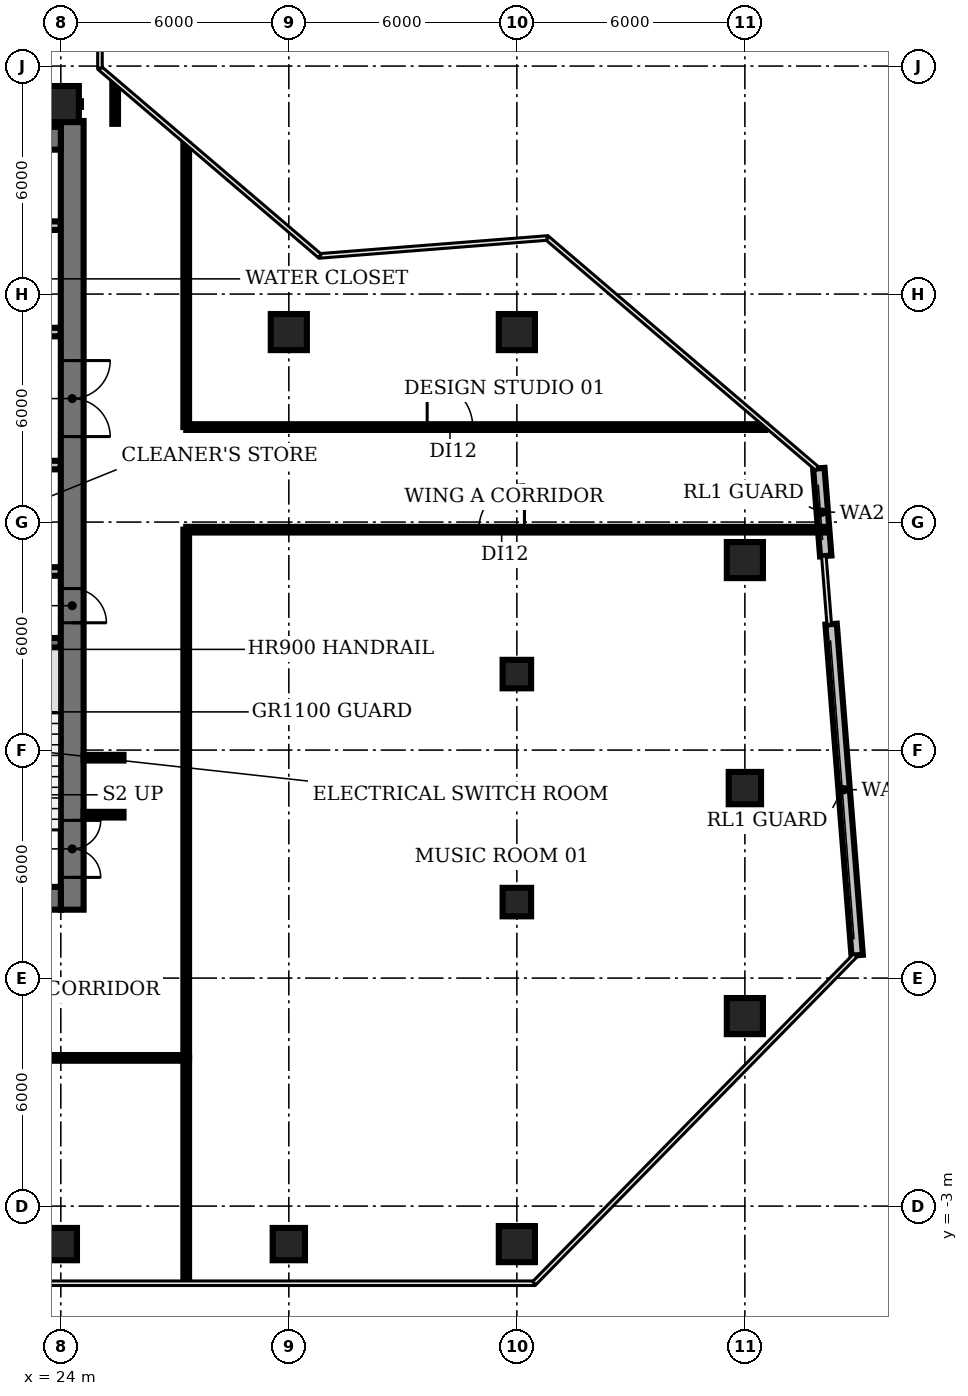
"""IFC4 building model, lengths in metres.
Left out: names, types, materials, properties, quantities, classifications, styles, units other than length and angle.
Written with IfcOpenShell. Run it as: python <this file> out.ifc"""

import sys

from ifc_helpers import new_model, si_unit, direction, frame, frame_2d, origin, origin_2d, place, context, subcontext, project, spatial, rectangle, circle, extrude, element, fill, save


model = new_model("IFC4")
c1 = context("Model", 3, precision=1e-05, world=origin(), true_north=direction((0.0, 1.0)))
c2 = subcontext(c1, "Body", "Model", "MODEL_VIEW")
j1 = project(units=[si_unit("LENGTHUNIT", "METRE"), si_unit("PLANEANGLEUNIT", "RADIAN")], contexts=[c1])
p1 = place(None, origin())
s1 = spatial("IfcSite", under=j1, at=p1, CompositionType="ELEMENT")
p2 = place(p1, origin())
s2 = spatial("IfcBuilding", under=s1, at=p2, CompositionType="ELEMENT")
p3 = place(p2, frame((0.0, 0.0, 188.6)))
s3 = spatial("IfcBuildingStorey", under=s2, at=p3, CompositionType="ELEMENT", Elevation=188.6)
p4 = place(p3, frame((24.0, -4.0, 0.0), z_axis=(0.0, 0.0, 1.0), x_axis=(1.0, 0.0, 0.0)))
e1 = element("IfcColumn", 1, at=p4, inside=s3, PredefinedType="COLUMN", context=c2, shape_type="SweptSolid", body=[
    extrude(rectangle(XDim=0.85, YDim=0.85, at=origin_2d()), origin(), (0.0, 0.0, 1.0), 3.85),
])
p5 = place(p3, frame((24.0, 26.0, 0.0), z_axis=(0.0, 0.0, 1.0), x_axis=(1.0, 0.0, 0.0)))
e2 = element("IfcColumn", 2, at=p5, inside=s3, PredefinedType="COLUMN", context=c2, shape_type="SweptSolid", body=[
    extrude(circle(Radius=0.475, at=origin_2d()), origin(), (0.0, 0.0, 1.0), 3.85),
])
p6 = place(p3, frame((30.0, -4.0, 0.0), z_axis=(0.0, 0.0, 1.0), x_axis=(1.0, 0.0, 0.0)))
e3 = element("IfcColumn", 3, at=p6, inside=s3, PredefinedType="COLUMN", context=c2, shape_type="SweptSolid", body=[
    extrude(rectangle(XDim=0.85, YDim=0.85, at=origin_2d()), origin(), (0.0, 0.0, 1.0), 3.85),
])
for number, where, z_axis, x_axis in (
    (4, (30.0, 20.0, 0.0), (0.0, 0.0, 1.0), (1.0, 0.0, 0.0)),
    (5, (36.0, -4.0, 0.0), (0.0, 0.0, 1.0), (1.0, 0.0, 0.0)),
):
    element("IfcColumn", number, at=place(p3, frame(where, z_axis=z_axis, x_axis=x_axis)), inside=s3, PredefinedType="COLUMN", context=c2, shape_type="SweptSolid", body=[
        extrude(circle(Radius=0.475, at=origin_2d()), origin(), (0.0, 0.0, 1.0), 3.85),
    ])
for number, where, z_axis, x_axis in (
    (6, (36.0, 5.0, 0.0), (0.0, 0.0, 1.0), (1.0, 0.0, 0.0)),
    (7, (36.0, 11.0, 0.0), (0.0, 0.0, 1.0), (1.0, 0.0, 0.0)),
):
    element("IfcColumn", number, at=place(p3, frame(where, z_axis=z_axis, x_axis=x_axis)), inside=s3, PredefinedType="COLUMN", context=c2, shape_type="SweptSolid", body=[
        extrude(rectangle(XDim=0.75, YDim=0.75, at=origin_2d()), origin(), (0.0, 0.0, 1.0), 3.85),
    ])
for number, where, z_axis, x_axis in (
    (8, (36.0, 20.0, 0.0), (0.0, 0.0, 1.0), (1.0, 0.0, 0.0)),
    (9, (42.0, 2.0, 0.0), (0.0, 0.0, 1.0), (1.0, 0.0, 0.0)),
):
    element("IfcColumn", number, at=place(p3, frame(where, z_axis=z_axis, x_axis=x_axis)), inside=s3, PredefinedType="COLUMN", context=c2, shape_type="SweptSolid", body=[
        extrude(circle(Radius=0.475, at=origin_2d()), origin(), (0.0, 0.0, 1.0), 3.85),
    ])
p7 = place(p3, frame((42.0, 8.0, 0.0), z_axis=(0.0, 0.0, 1.0), x_axis=(1.0, 0.0, 0.0)))
e10 = element("IfcColumn", 10, at=p7, inside=s3, PredefinedType="COLUMN", context=c2, shape_type="SweptSolid", body=[
    extrude(rectangle(XDim=0.85, YDim=0.85, at=origin_2d()), origin(), (0.0, 0.0, 1.0), 3.85),
])
p8 = place(p3, frame((42.0, 14.0, 0.0), z_axis=(0.0, 0.0, 1.0), x_axis=(1.0, 0.0, 0.0)))
e11 = element("IfcColumn", 11, at=p8, inside=s3, PredefinedType="COLUMN", context=c2, shape_type="SweptSolid", body=[
    extrude(circle(Radius=0.475, at=origin_2d()), origin(), (0.0, 0.0, 1.0), 3.85),
])
p9 = place(p3, frame((44.955, 3.601, 0.0), z_axis=(0.0, 0.0, 1.0), x_axis=(-0.078467243586, 0.996916692449, 0.0)))
e12 = element("IfcWall", 12, at=p9, inside=s3, PredefinedType="SOLIDWALL", context=c2, shape_type="SweptSolid", body=[
    extrude(rectangle(XDim=8.74, YDim=0.3, at=frame_2d((4.37, 0.0))), origin(), (0.0, 0.0, 1.0), 3.85),
])
p10 = place(p3, frame((44.128, 14.108, 0.0), z_axis=(0.0, 0.0, 1.0), x_axis=(-0.078415427879, 0.996920769505, 0.0)))
e13 = element("IfcWall", 13, at=p10, inside=s3, PredefinedType="SOLIDWALL", context=c2, shape_type="SweptSolid", body=[
    extrude(rectangle(XDim=2.313, YDim=0.3, at=frame_2d((1.157, 0.0))), origin(), (0.0, 0.0, 1.0), 3.85),
])
p11 = place(p3, frame((20.85, 11.825, 0.0), z_axis=(0.0, 0.0, 1.0), x_axis=(1.0, 0.0, 0.0)))
e14 = element("IfcWall", 14, at=p11, inside=s3, PredefinedType="SHEAR", context=c2, shape_type="SweptSolid", body=[
    extrude(rectangle(XDim=3.15, YDim=0.25, at=frame_2d((1.575, 0.0))), origin(), (0.0, 0.0, 1.0), 3.85),
])
p12 = place(p3, frame((16.6, 13.7, 0.0), z_axis=(0.0, 0.0, 1.0), x_axis=(1.0, 0.0, 0.0)))
e15 = element("IfcWall", 15, at=p12, inside=s3, PredefinedType="PARTITIONING", context=c2, shape_type="SweptSolid", body=[
    extrude(rectangle(XDim=7.4, YDim=0.225, at=frame_2d((3.7, 0.0))), origin(), (0.0, 0.0, 1.0), 3.85),
])
p13 = place(p3, frame((9.4, 16.5, 0.0), z_axis=(0.0, 0.0, 1.0), x_axis=(1.0, 0.0, 0.0)))
e16 = element("IfcWall", 16, at=p13, inside=s3, PredefinedType="PARTITIONING", context=c2, shape_type="SweptSolid", body=[
    extrude(rectangle(XDim=14.6, YDim=0.225, at=frame_2d((7.3, 0.0))), origin(), (0.0, 0.0, 1.0), 3.85),
])
p14 = place(p13, frame((0.85, 0.0, 0.0)))
e17 = element("IfcOpeningElement", 17, at=p14, cuts=e16, PredefinedType="OPENING", context=c2, shape_type="SweptSolid", body=[
    extrude(rectangle(XDim=0.9, YDim=2.1, at=frame_2d((0.45, 1.05))), frame((0.0, 0.123, 0.0), z_axis=(0.0, -1.0, 0.0), x_axis=(1.0, 0.0, 0.0)), (0.0, 0.0, 1.0), 0.245),
])
p15 = place(p13, frame((3.625, 0.0, 0.0)))
e18 = element("IfcOpeningElement", 18, at=p15, cuts=e16, PredefinedType="OPENING", context=c2, shape_type="SweptSolid", body=[
    extrude(rectangle(XDim=0.9, YDim=2.1, at=frame_2d((0.45, 1.05))), frame((0.0, 0.123, 0.0), z_axis=(0.0, -1.0, 0.0), x_axis=(1.0, 0.0, 0.0)), (0.0, 0.0, 1.0), 0.245),
])
p16 = place(p13, frame((7.775, 0.0, 0.0)))
e19 = element("IfcOpeningElement", 19, at=p16, cuts=e16, PredefinedType="OPENING", context=c2, shape_type="SweptSolid", body=[
    extrude(rectangle(XDim=1.0, YDim=2.1, at=frame_2d((0.5, 1.05))), frame((0.0, 0.123, 0.0), z_axis=(0.0, -1.0, 0.0), x_axis=(1.0, 0.0, 0.0)), (0.0, 0.0, 1.0), 0.245),
])
p17 = place(p13, frame((12.4, 0.0, 0.0)))
e20 = element("IfcOpeningElement", 20, at=p17, cuts=e16, PredefinedType="OPENING", context=c2, shape_type="SweptSolid", body=[
    extrude(rectangle(XDim=1.0, YDim=2.1, at=frame_2d((0.5, 1.05))), frame((0.0, 0.123, 0.0), z_axis=(0.0, -1.0, 0.0), x_axis=(1.0, 0.0, 0.0)), (0.0, 0.0, 1.0), 0.245),
])
p18 = place(p3, frame((24.0, 20.0, 0.0), z_axis=(0.0, 0.0, 1.0), x_axis=(-1.0, 0.0, 0.0)))
e21 = element("IfcWall", 21, at=p18, inside=s3, PredefinedType="PARTITIONING", context=c2, shape_type="SweptSolid", body=[
    extrude(rectangle(XDim=14.6, YDim=0.225, at=frame_2d((7.3, 0.0))), origin(), (0.0, 0.0, 1.0), 3.85),
])
p19 = place(p18, frame((12.75, 0.0, 0.0)))
e22 = element("IfcOpeningElement", 22, at=p19, cuts=e21, PredefinedType="OPENING", context=c2, shape_type="SweptSolid", body=[
    extrude(rectangle(XDim=1.1, YDim=2.1, at=frame_2d((0.55, 1.05))), frame((0.0, 0.123, 0.0), z_axis=(0.0, -1.0, 0.0), x_axis=(1.0, 0.0, 0.0)), (0.0, 0.0, 1.0), 0.245),
])
p20 = place(p18, frame((9.95, 0.0, 0.0)))
e23 = element("IfcOpeningElement", 23, at=p20, cuts=e21, PredefinedType="OPENING", context=c2, shape_type="SweptSolid", body=[
    extrude(rectangle(XDim=1.1, YDim=2.1, at=frame_2d((0.55, 1.05))), frame((0.0, 0.123, 0.0), z_axis=(0.0, -1.0, 0.0), x_axis=(1.0, 0.0, 0.0)), (0.0, 0.0, 1.0), 0.245),
])
p21 = place(p18, frame((7.15, 0.0, 0.0)))
e24 = element("IfcOpeningElement", 24, at=p21, cuts=e21, PredefinedType="OPENING", context=c2, shape_type="SweptSolid", body=[
    extrude(rectangle(XDim=1.1, YDim=2.1, at=frame_2d((0.55, 1.05))), frame((0.0, 0.123, 0.0), z_axis=(0.0, -1.0, 0.0), x_axis=(1.0, 0.0, 0.0)), (0.0, 0.0, 1.0), 0.245),
])
p22 = place(p18, frame((4.35, 0.0, 0.0)))
e25 = element("IfcOpeningElement", 25, at=p22, cuts=e21, PredefinedType="OPENING", context=c2, shape_type="SweptSolid", body=[
    extrude(rectangle(XDim=1.1, YDim=2.1, at=frame_2d((0.55, 1.05))), frame((0.0, 0.123, 0.0), z_axis=(0.0, -1.0, 0.0), x_axis=(1.0, 0.0, 0.0)), (0.0, 0.0, 1.0), 0.245),
])
p23 = place(p18, frame((1.2, 0.0, 0.0)))
e26 = element("IfcOpeningElement", 26, at=p23, cuts=e21, PredefinedType="OPENING", context=c2, shape_type="SweptSolid", body=[
    extrude(rectangle(XDim=1.0, YDim=2.1, at=frame_2d((0.5, 1.05))), frame((0.0, 0.123, 0.0), z_axis=(0.0, -1.0, 0.0), x_axis=(1.0, 0.0, 0.0)), (0.0, 0.0, 1.0), 0.245),
])
p24 = place(p3, frame((9.4, 22.8, 0.0), z_axis=(0.0, 0.0, 1.0), x_axis=(1.0, 0.0, 0.0)))
e27 = element("IfcWall", 27, at=p24, inside=s3, PredefinedType="PARTITIONING", context=c2, shape_type="SweptSolid", body=[
    extrude(rectangle(XDim=14.6, YDim=0.225, at=frame_2d((7.3, 0.0))), origin(), (0.0, 0.0, 1.0), 3.85),
])
p25 = place(p3, frame((24.3, 25.555, 0.0), z_axis=(0.0, 0.0, 1.0), x_axis=(0.0, -1.0, 0.0)))
e28 = element("IfcWall", 28, at=p25, inside=s3, PredefinedType="SHEAR", context=c2, shape_type="SweptSolid", body=[
    extrude(rectangle(XDim=20.755, YDim=0.6, at=frame_2d((10.377, 0.0))), origin(), (0.0, 0.0, 1.0), 3.85),
])
p26 = place(p25, frame((18.405, 0.0, 0.0)))
e29 = element("IfcOpeningElement", 29, at=p26, cuts=e28, PredefinedType="OPENING", context=c2, shape_type="SweptSolid", body=[
    extrude(rectangle(XDim=1.5, YDim=2.1, at=frame_2d((0.75, 1.05))), frame((0.0, 0.31, 0.0), z_axis=(0.0, -1.0, 0.0), x_axis=(1.0, 0.0, 0.0)), (0.0, 0.0, 1.0), 0.62),
])
p27 = place(p25, frame((12.305, 0.0, 0.0)))
e30 = element("IfcOpeningElement", 30, at=p27, cuts=e28, PredefinedType="OPENING", context=c2, shape_type="SweptSolid", body=[
    extrude(rectangle(XDim=0.9, YDim=2.1, at=frame_2d((0.45, 1.05))), frame((0.0, 0.31, 0.0), z_axis=(0.0, -1.0, 0.0), x_axis=(1.0, 0.0, 0.0)), (0.0, 0.0, 1.0), 0.62),
])
p28 = place(p25, frame((6.305, 0.0, 0.0)))
e31 = element("IfcOpeningElement", 31, at=p28, cuts=e28, PredefinedType="OPENING", context=c2, shape_type="SweptSolid", body=[
    extrude(rectangle(XDim=2.0, YDim=2.1, at=frame_2d((1.0, 1.05))), frame((0.0, 0.31, 0.0), z_axis=(0.0, -1.0, 0.0), x_axis=(1.0, 0.0, 0.0)), (0.0, 0.0, 1.0), 0.62),
])
p29 = place(p3, frame((24.0, 5.1, 0.0), z_axis=(0.0, 0.0, 1.0), x_axis=(-1.0, 0.0, 0.0)))
e32 = element("IfcWall", 32, at=p29, inside=s3, PredefinedType="SHEAR", context=c2, shape_type="SweptSolid", body=[
    extrude(rectangle(XDim=18.0, YDim=0.6, at=frame_2d((9.0, 0.0))), origin(), (0.0, 0.0, 1.0), 3.85),
])
p30 = place(p29, frame((13.0, 0.0, 0.0)))
e33 = element("IfcOpeningElement", 33, at=p30, cuts=e32, PredefinedType="OPENING", context=c2, shape_type="SweptSolid", body=[
    extrude(rectangle(XDim=1.2, YDim=2.1, at=frame_2d((0.6, 1.05))), frame((0.0, 0.31, 0.0), z_axis=(0.0, -1.0, 0.0), x_axis=(1.0, 0.0, 0.0)), (0.0, 0.0, 1.0), 0.62),
])
p31 = place(p29, frame((4.9, 0.0, 0.0)))
e34 = element("IfcOpeningElement", 34, at=p31, cuts=e32, PredefinedType="OPENING", context=c2, shape_type="SweptSolid", body=[
    extrude(rectangle(XDim=1.0, YDim=2.1, at=frame_2d((0.5, 1.05))), frame((0.0, 0.31, 0.0), z_axis=(0.0, -1.0, 0.0), x_axis=(1.0, 0.0, 0.0)), (0.0, 0.0, 1.0), 0.62),
])
p32 = place(p3, frame((6.0, 25.1, 0.0), z_axis=(0.0, 0.0, 1.0), x_axis=(1.0, 0.0, 0.0)))
e35 = element("IfcWall", 35, at=p32, inside=s3, PredefinedType="SHEAR", context=c2, shape_type="SweptSolid", body=[
    extrude(rectangle(XDim=18.0, YDim=0.6, at=frame_2d((9.0, 0.0))), origin(), (0.0, 0.0, 1.0), 3.85),
])
p33 = place(p3, frame((23.48, 26.0, 0.0), z_axis=(0.0, 0.0, 1.0), x_axis=(1.0, 0.0, 0.0)))
e36 = element("IfcWall", 36, at=p33, inside=s3, PredefinedType="PARTITIONING", context=c2, shape_type="SweptSolid", body=[
    extrude(rectangle(XDim=1.05, YDim=0.15, at=frame_2d((0.525, 0.0))), origin(), (0.0, 0.0, 1.0), 2.88),
])
for number, where, z_axis, x_axis in (
    (37, (24.6, 7.3, 0.0), (0.0, 0.0, 1.0), (1.0, 0.0, 0.0)),
    (38, (24.6, 8.8, 0.0), (0.0, 0.0, 1.0), (1.0, 0.0, 0.0)),
):
    element("IfcWall", number, at=place(p3, frame(where, z_axis=z_axis, x_axis=x_axis)), inside=s3, PredefinedType="PARTITIONING", context=c2, shape_type="SweptSolid", body=[
        extrude(rectangle(XDim=1.05, YDim=0.15, at=frame_2d((0.525, 0.0))), origin(), (0.0, 0.0, 1.0), 2.88),
    ])
p34 = place(p3, frame((25.43, 25.48, 0.0), z_axis=(0.0, 0.0, 1.0), x_axis=(0.0, 1.0, 0.0)))
e39 = element("IfcWall", 39, at=p34, inside=s3, PredefinedType="PARTITIONING", context=c2, shape_type="SweptSolid", body=[
    extrude(rectangle(XDim=1.05, YDim=0.15, at=frame_2d((0.525, 0.0))), origin(), (0.0, 0.0, 1.0), 2.88),
])
p35 = place(p3, frame((27.3, -4.98, 0.0), z_axis=(0.0, 0.0, 1.0), x_axis=(0.0, 1.0, 0.0)))
e40 = element("IfcWall", 40, at=p35, inside=s3, PredefinedType="PARTITIONING", context=c2, shape_type="SweptSolid", body=[
    extrude(rectangle(XDim=5.88, YDim=0.15, at=frame_2d((2.94, 0.0))), origin(), (0.0, 0.0, 1.0), 2.88),
])
p36 = place(p3, frame((27.3, 0.9, 0.0), z_axis=(0.0, 0.0, 1.0), x_axis=(-1.0, 0.0, 0.0)))
e41 = element("IfcWall", 41, at=p36, inside=s3, PredefinedType="PARTITIONING", context=c2, shape_type="SweptSolid", body=[
    extrude(rectangle(XDim=24.6, YDim=0.15, at=frame_2d((12.3, 0.0))), origin(), (0.0, 0.0, 1.0), 2.88),
])
p37 = place(p36, frame((11.8, 0.0, 0.0)))
e42 = element("IfcOpeningElement", 42, at=p37, cuts=e41, PredefinedType="OPENING", context=c2, shape_type="SweptSolid", body=[
    extrude(rectangle(XDim=1.2, YDim=2.1, at=frame_2d((0.6, 1.05))), frame((0.0, 0.085, 0.0), z_axis=(0.0, -1.0, 0.0), x_axis=(1.0, 0.0, 0.0)), (0.0, 0.0, 1.0), 0.17),
])
p38 = place(p3, frame((27.3, 0.9, 0.0), z_axis=(0.0, 0.0, 1.0), x_axis=(0.0, 1.0, 0.0)))
e43 = element("IfcWall", 43, at=p38, inside=s3, PredefinedType="PARTITIONING", context=c2, shape_type="SweptSolid", body=[
    extrude(rectangle(XDim=13.9, YDim=0.15, at=frame_2d((6.95, 0.0))), origin(), (0.0, 0.0, 1.0), 2.88),
])
p39 = place(p3, frame((27.3, 14.8, 0.0), z_axis=(0.0, 0.0, 1.0), x_axis=(1.0, 0.0, 0.0)))
e44 = element("IfcWall", 44, at=p39, inside=s3, PredefinedType="PARTITIONING", context=c2, shape_type="SweptSolid", body=[
    extrude(rectangle(XDim=16.784, YDim=0.15, at=frame_2d((8.392, 0.0))), origin(), (0.0, 0.0, 1.0), 2.88),
])
p40 = place(p39, frame((7.7, 0.0, 0.0)))
e45 = element("IfcOpeningElement", 45, at=p40, cuts=e44, PredefinedType="OPENING", context=c2, shape_type="SweptSolid", body=[
    extrude(rectangle(XDim=1.2, YDim=2.1, at=frame_2d((0.6, 1.05))), frame((0.0, 0.085, 0.0), z_axis=(0.0, -1.0, 0.0), x_axis=(1.0, 0.0, 0.0)), (0.0, 0.0, 1.0), 0.17),
])
p41 = place(p3, frame((27.3, 17.5, 0.0), z_axis=(0.0, 0.0, 1.0), x_axis=(0.0, 1.0, 0.0)))
e46 = element("IfcWall", 46, at=p41, inside=s3, PredefinedType="PARTITIONING", context=c2, shape_type="SweptSolid", body=[
    extrude(rectangle(XDim=7.44, YDim=0.15, at=frame_2d((3.72, 0.0))), origin(), (0.0, 0.0, 1.0), 2.88),
])
p42 = place(p3, frame((27.3, 17.5, 0.0), z_axis=(0.0, 0.0, 1.0), x_axis=(1.0, 0.0, 0.0)))
e47 = element("IfcWall", 47, at=p42, inside=s3, PredefinedType="PARTITIONING", context=c2, shape_type="SweptSolid", body=[
    extrude(rectangle(XDim=15.24, YDim=0.15, at=frame_2d((7.62, 0.0))), origin(), (0.0, 0.0, 1.0), 2.88),
])
p43 = place(p42, frame((6.34, 0.0, 0.0)))
e48 = element("IfcOpeningElement", 48, at=p43, cuts=e47, PredefinedType="OPENING", context=c2, shape_type="SweptSolid", body=[
    extrude(rectangle(XDim=1.2, YDim=2.1, at=frame_2d((0.6, 1.05))), frame((0.0, 0.085, 0.0), z_axis=(0.0, -1.0, 0.0), x_axis=(1.0, 0.0, 0.0)), (0.0, 0.0, 1.0), 0.17),
])
p44 = place(p26, origin())
e49 = element("IfcDoor", 49, at=p44, inside=s3, OperationType="DOUBLE_DOOR_SINGLE_SWING", PredefinedType="DOOR", context=c2, shape_type="SweptSolid", body=[
    extrude(rectangle(XDim=1.5, YDim=2.1, at=frame_2d((0.75, 1.05))), frame((0.0, 0.025, 0.0), z_axis=(0.0, -1.0, 0.0), x_axis=(1.0, 0.0, 0.0)), (0.0, 0.0, 1.0), 0.05),
])
fill(e29, e49)
p45 = place(p27, origin())
e50 = element("IfcDoor", 50, at=p45, inside=s3, OperationType="SINGLE_SWING_RIGHT", PredefinedType="DOOR", context=c2, shape_type="SweptSolid", body=[
    extrude(rectangle(XDim=0.9, YDim=2.1, at=frame_2d((0.45, 1.05))), frame((0.0, -0.24, 0.0), z_axis=(0.0, -1.0, 0.0), x_axis=(1.0, 0.0, 0.0)), (0.0, 0.0, 1.0), 0.05),
])
fill(e30, e50)
p46 = place(p28, origin())
e51 = element("IfcDoor", 51, at=p46, inside=s3, OperationType="DOUBLE_DOOR_SINGLE_SWING", PredefinedType="DOOR", context=c2, shape_type="SweptSolid", body=[
    extrude(rectangle(XDim=2.0, YDim=2.1, at=frame_2d((1.0, 1.05))), frame((0.0, 0.025, 0.0), z_axis=(0.0, -1.0, 0.0), x_axis=(1.0, 0.0, 0.0)), (0.0, 0.0, 1.0), 0.05),
])
fill(e31, e51)
p47 = place(p40, origin())
e52 = element("IfcDoor", 52, at=p47, inside=s3, OperationType="SINGLE_SWING_RIGHT", PredefinedType="DOOR", context=c2, shape_type="SweptSolid", body=[
    extrude(rectangle(XDim=1.2, YDim=2.1, at=frame_2d((0.6, 1.05))), frame((0.0, 0.025, 0.0), z_axis=(0.0, -1.0, 0.0), x_axis=(1.0, 0.0, 0.0)), (0.0, 0.0, 1.0), 0.05),
])
fill(e45, e52)
p48 = place(p43, origin())
e53 = element("IfcDoor", 53, at=p48, inside=s3, OperationType="SINGLE_SWING_LEFT", PredefinedType="DOOR", context=c2, shape_type="SweptSolid", body=[
    extrude(rectangle(XDim=1.2, YDim=2.1, at=frame_2d((0.6, 1.05))), frame((0.0, 0.025, 0.0), z_axis=(0.0, -1.0, 0.0), x_axis=(1.0, 0.0, 0.0)), (0.0, 0.0, 1.0), 0.05),
])
fill(e48, e53)
save(model, sys.argv[1])
